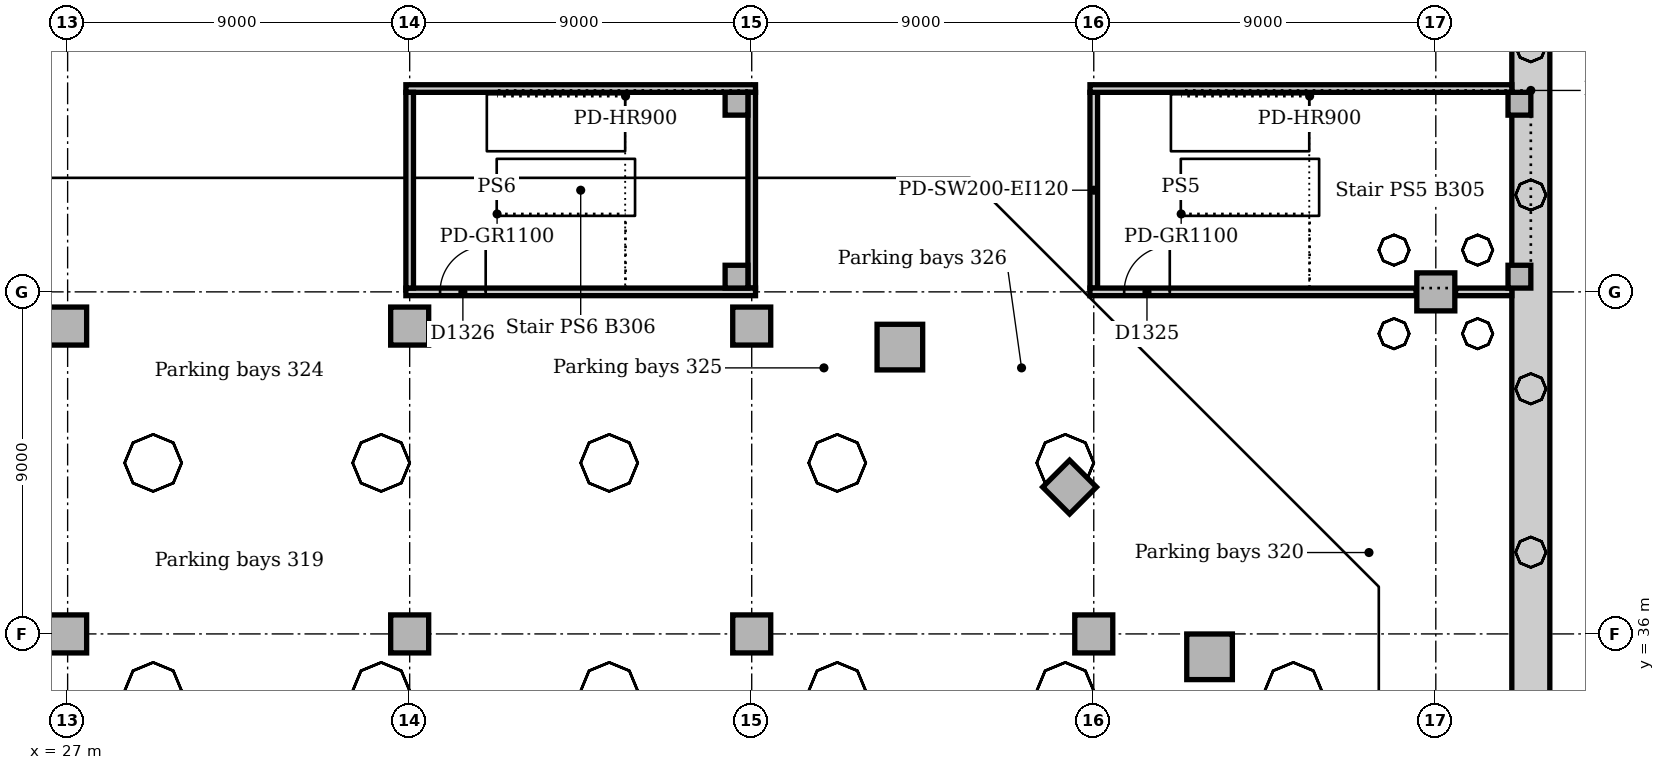
"""IFC4 building model, lengths in metres.
Left out: names, types, materials, properties, quantities, classifications, styles, units other than length and angle.
Written with IfcOpenShell. Run it as: python <this file> out.ifc"""

import sys

from ifc_helpers import new_model, si_unit, direction, frame, frame_2d, origin, origin_2d, place, context, subcontext, project, spatial, rectangle, extrude, element, fill, save


model = new_model("IFC4")
c1 = context("Model", 3, precision=1e-05, world=origin(), true_north=direction((0.0, 1.0)))
c2 = subcontext(c1, "Body", "Model", "MODEL_VIEW")
j1 = project(units=[si_unit("LENGTHUNIT", "METRE"), si_unit("PLANEANGLEUNIT", "RADIAN")], contexts=[c1])
p1 = place(None, origin())
s1 = spatial("IfcSite", under=j1, at=p1, CompositionType="ELEMENT")
p2 = place(p1, origin())
s2 = spatial("IfcBuilding", under=s1, at=p2, CompositionType="ELEMENT")
p3 = place(p2, frame((0.0, 0.0, -14.0)))
s3 = spatial("IfcBuildingStorey", under=s2, at=p3, CompositionType="ELEMENT", Elevation=-14.0)
for number, where, z_axis, x_axis in (
    (1, (57.047, 35.398, 0.0), (0.0, 0.0, 1.0), (1.0, 0.0, 0.0)),
    (2, (48.898, 43.547, 0.0), (0.0, 0.0, 1.0), (1.0, 0.0, 0.0)),
):
    element("IfcColumn", number, at=place(p3, frame(where, z_axis=z_axis, x_axis=x_axis)), inside=s3, PredefinedType="COLUMN", context=c2, shape_type="SweptSolid", body=[
        extrude(rectangle(XDim=1.2, YDim=1.2, at=origin_2d()), origin(), (0.0, 0.0, 1.0), 4.15),
    ])
for number, where, z_axis, x_axis in (
    (3, (53.364, 39.864, 0.0), (0.0, 0.0, 1.0), (0.707, 0.707, 0.0)),
    (4, (27.0, 44.1, 0.0), (0.0, 0.0, 1.0), (1.0, 0.0, 0.0)),
    (5, (36.0, 44.1, 0.0), (0.0, 0.0, 1.0), (1.0, 0.0, 0.0)),
    (6, (45.0, 44.1, 0.0), (0.0, 0.0, 1.0), (1.0, 0.0, 0.0)),
    (7, (27.0, 36.0, 0.0), (0.0, 0.0, 1.0), (1.0, 0.0, 0.0)),
    (8, (36.0, 36.0, 0.0), (0.0, 0.0, 1.0), (1.0, 0.0, 0.0)),
    (9, (45.0, 36.0, 0.0), (0.0, 0.0, 1.0), (1.0, 0.0, 0.0)),
    (10, (54.0, 36.0, 0.0), (0.0, 0.0, 1.0), (1.0, 0.0, 0.0)),
):
    element("IfcColumn", number, at=place(p3, frame(where, z_axis=z_axis, x_axis=x_axis)), inside=s3, PredefinedType="COLUMN", context=c2, shape_type="SweptSolid", body=[
        extrude(rectangle(XDim=1.0, YDim=1.0, at=origin_2d()), origin(), (0.0, 0.0, 1.0), 4.15),
    ])
p4 = place(p3, frame((65.5, 53.641, 0.0), z_axis=(0.0, 0.0, 1.0), x_axis=(0.0, -1.0, 0.0)))
e11 = element("IfcWall", 11, at=p4, inside=s3, PredefinedType="SOLIDWALL", context=c2, shape_type="SweptSolid", body=[
    extrude(rectangle(XDim=62.282, YDim=1.0, at=frame_2d((31.141, 0.0))), origin(), (0.0, 0.0, 1.0), 4.5),
])
p5 = place(p3, frame((63.0, 45.0, 0.0), z_axis=(0.0, 0.0, 1.0), x_axis=(1.0, 0.0, 0.0)))
e12 = element("IfcColumn", 12, at=p5, inside=s3, PredefinedType="COLUMN", context=c2, shape_type="SweptSolid", body=[
    extrude(rectangle(XDim=1.0, YDim=1.0, at=origin_2d()), origin(), (0.0, 0.0, 1.0), 4.15),
])
for number, where, z_axis, x_axis in (
    (13, (65.2, 49.95, 0.0), (0.0, 0.0, 1.0), (1.0, 0.0, 0.0)),
    (14, (65.2, 45.4, 0.0), (0.0, 0.0, 1.0), (1.0, 0.0, 0.0)),
    (15, (44.6, 49.95, 0.0), (0.0, 0.0, 1.0), (1.0, 0.0, 0.0)),
    (16, (44.6, 45.4, 0.0), (0.0, 0.0, 1.0), (1.0, 0.0, 0.0)),
):
    element("IfcColumn", number, at=place(p3, frame(where, z_axis=z_axis, x_axis=x_axis)), inside=s3, PredefinedType="COLUMN", context=c2, shape_type="SweptSolid", body=[
        extrude(rectangle(XDim=0.6, YDim=0.6, at=origin_2d()), origin(), (0.0, 0.0, 1.0), 4.5),
    ])
p6 = place(p3, frame((54.0, 45.1, 0.0), z_axis=(0.0, 0.0, 1.0), x_axis=(0.0, 1.0, 0.0)))
e17 = element("IfcWall", 17, at=p6, inside=s3, PredefinedType="SOLIDWALL", context=c2, shape_type="SweptSolid", body=[
    extrude(rectangle(XDim=5.15, YDim=0.2, at=frame_2d((2.575, 0.0))), origin(), (0.0, 0.0, 1.0), 4.15),
])
p7 = place(p3, frame((53.9, 50.35, 0.0), z_axis=(0.0, 0.0, 1.0), x_axis=(1.0, 0.0, 0.0)))
e18 = element("IfcWall", 18, at=p7, inside=s3, PredefinedType="SOLIDWALL", context=c2, shape_type="SweptSolid", body=[
    extrude(rectangle(XDim=11.1, YDim=0.2, at=frame_2d((5.55, 0.0))), origin(), (0.0, 0.0, 1.0), 4.15),
])
p8 = place(p3, frame((53.9, 45.0, 0.0), z_axis=(0.0, 0.0, 1.0), x_axis=(1.0, 0.0, 0.0)))
e19 = element("IfcWall", 19, at=p8, inside=s3, PredefinedType="SOLIDWALL", context=c2, shape_type="SweptSolid", body=[
    extrude(rectangle(XDim=8.58, YDim=0.2, at=frame_2d((4.29, 0.0))), origin(), (0.0, 0.0, 1.0), 4.15),
])
p9 = place(p8, frame((0.9, 0.0, 0.0)))
e20 = element("IfcOpeningElement", 20, at=p9, cuts=e19, PredefinedType="OPENING", context=c2, shape_type="SweptSolid", body=[
    extrude(rectangle(XDim=1.2, YDim=2.1, at=frame_2d((0.6, 1.05))), frame((0.0, 0.11, 0.0), z_axis=(0.0, -1.0, 0.0), x_axis=(1.0, 0.0, 0.0)), (0.0, 0.0, 1.0), 0.22),
])
p10 = place(p3, frame((63.52, 45.0, 0.0), z_axis=(0.0, 0.0, 1.0), x_axis=(1.0, 0.0, 0.0)))
e21 = element("IfcWall", 21, at=p10, inside=s3, PredefinedType="SOLIDWALL", context=c2, shape_type="SweptSolid", body=[
    extrude(rectangle(XDim=1.48, YDim=0.2, at=frame_2d((0.74, 0.0))), origin(), (0.0, 0.0, 1.0), 4.15),
])
p11 = place(p3, frame((35.9, 50.35, 0.0), z_axis=(0.0, 0.0, 1.0), x_axis=(1.0, 0.0, 0.0)))
e22 = element("IfcWall", 22, at=p11, inside=s3, PredefinedType="SOLIDWALL", context=c2, shape_type="SweptSolid", body=[
    extrude(rectangle(XDim=9.2, YDim=0.2, at=frame_2d((4.6, 0.0))), origin(), (0.0, 0.0, 1.0), 4.15),
])
p12 = place(p3, frame((45.0, 45.1, 0.0), z_axis=(0.0, 0.0, 1.0), x_axis=(0.0, 1.0, 0.0)))
e23 = element("IfcWall", 23, at=p12, inside=s3, PredefinedType="SOLIDWALL", context=c2, shape_type="SweptSolid", body=[
    extrude(rectangle(XDim=5.15, YDim=0.2, at=frame_2d((2.575, 0.0))), origin(), (0.0, 0.0, 1.0), 4.15),
])
p13 = place(p3, frame((35.9, 45.0, 0.0), z_axis=(0.0, 0.0, 1.0), x_axis=(1.0, 0.0, 0.0)))
e24 = element("IfcWall", 24, at=p13, inside=s3, PredefinedType="SOLIDWALL", context=c2, shape_type="SweptSolid", body=[
    extrude(rectangle(XDim=9.2, YDim=0.2, at=frame_2d((4.6, 0.0))), origin(), (0.0, 0.0, 1.0), 4.15),
])
p14 = place(p13, frame((0.9, 0.0, 0.0)))
e25 = element("IfcOpeningElement", 25, at=p14, cuts=e24, PredefinedType="OPENING", context=c2, shape_type="SweptSolid", body=[
    extrude(rectangle(XDim=1.2, YDim=2.1, at=frame_2d((0.6, 1.05))), frame((0.0, 0.11, 0.0), z_axis=(0.0, -1.0, 0.0), x_axis=(1.0, 0.0, 0.0)), (0.0, 0.0, 1.0), 0.22),
])
p15 = place(p3, frame((36.0, 45.1, 0.0), z_axis=(0.0, 0.0, 1.0), x_axis=(0.0, 1.0, 0.0)))
e26 = element("IfcWall", 26, at=p15, inside=s3, PredefinedType="SOLIDWALL", context=c2, shape_type="SweptSolid", body=[
    extrude(rectangle(XDim=5.15, YDim=0.2, at=frame_2d((2.575, 0.0))), origin(), (0.0, 0.0, 1.0), 4.15),
])
p16 = place(p9, origin())
e27 = element("IfcDoor", 27, at=p16, inside=s3, OperationType="SINGLE_SWING_RIGHT", PredefinedType="DOOR", context=c2, shape_type="SweptSolid", body=[
    extrude(rectangle(XDim=1.2, YDim=2.1, at=frame_2d((0.6, 1.05))), frame((0.0, 0.025, 0.0), z_axis=(0.0, -1.0, 0.0), x_axis=(1.0, 0.0, 0.0)), (0.0, 0.0, 1.0), 0.05),
])
fill(e20, e27)
p17 = place(p14, origin())
e28 = element("IfcDoor", 28, at=p17, inside=s3, OperationType="SINGLE_SWING_RIGHT", PredefinedType="DOOR", context=c2, shape_type="SweptSolid", body=[
    extrude(rectangle(XDim=1.2, YDim=2.1, at=frame_2d((0.6, 1.05))), frame((0.0, 0.025, 0.0), z_axis=(0.0, -1.0, 0.0), x_axis=(1.0, 0.0, 0.0)), (0.0, 0.0, 1.0), 0.05),
])
fill(e25, e28)
save(model, sys.argv[1])
